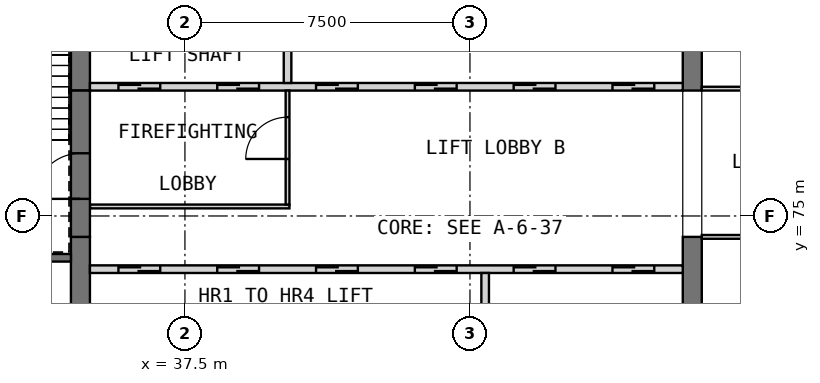
"""IFC4 building model, lengths in metres.
Left out: names, types, materials, properties, quantities, classifications, styles, units other than length and angle.
Written with IfcOpenShell. Run it as: python <this file> out.ifc"""

import sys

from ifc_helpers import new_model, si_unit, direction, frame, frame_2d, origin, place, context, subcontext, project, spatial, rectangle, extrude, element, fill, save


model = new_model("IFC4")
c1 = context("Model", 3, precision=1e-05, world=origin(), true_north=direction((0.0, 1.0)))
c2 = subcontext(c1, "Body", "Model", "MODEL_VIEW")
j1 = project(units=[si_unit("LENGTHUNIT", "METRE"), si_unit("PLANEANGLEUNIT", "RADIAN")], contexts=[c1])
p1 = place(None, origin())
s1 = spatial("IfcSite", under=j1, at=p1, CompositionType="ELEMENT")
p2 = place(p1, origin())
s2 = spatial("IfcBuilding", under=s1, at=p2, CompositionType="ELEMENT")
p3 = place(p2, frame((0.0, 0.0, 308.7)))
s3 = spatial("IfcBuildingStorey", under=s2, at=p3, CompositionType="ELEMENT", Elevation=308.7)
p4 = place(p3, frame((34.75, 68.05, 0.0), z_axis=(0.0, 0.0, 1.0), x_axis=(0.0, 1.0, 0.0)))
e1 = element("IfcWall", 1, at=p4, inside=s3, PredefinedType="SHEAR", context=c2, shape_type="SweptSolid", body=[
    extrude(rectangle(XDim=6.4, YDim=0.5, at=frame_2d((3.2, 0.0))), origin(), (0.0, 0.0, 1.0), 6.0),
])
p5 = place(p3, frame((34.75, 78.3, 0.0), z_axis=(0.0, 0.0, 1.0), x_axis=(0.0, 1.0, 0.0)))
e2 = element("IfcWall", 2, at=p5, inside=s3, PredefinedType="SHEAR", context=c2, shape_type="SweptSolid", body=[
    extrude(rectangle(XDim=3.6, YDim=0.5, at=frame_2d((1.8, 0.0))), origin(), (0.0, 0.0, 1.0), 6.0),
])
p6 = place(p3, frame((50.85, 68.05, 0.0), z_axis=(0.0, 0.0, 1.0), x_axis=(0.0, 1.0, 0.0)))
e3 = element("IfcWall", 3, at=p6, inside=s3, PredefinedType="SHEAR", context=c2, shape_type="SweptSolid", body=[
    extrude(rectangle(XDim=6.4, YDim=0.5, at=frame_2d((3.2, 0.0))), origin(), (0.0, 0.0, 1.0), 6.0),
])
p7 = place(p3, frame((50.85, 78.3, 0.0), z_axis=(0.0, 0.0, 1.0), x_axis=(0.0, 1.0, 0.0)))
e4 = element("IfcWall", 4, at=p7, inside=s3, PredefinedType="SHEAR", context=c2, shape_type="SweptSolid", body=[
    extrude(rectangle(XDim=3.6, YDim=0.5, at=frame_2d((1.8, 0.0))), origin(), (0.0, 0.0, 1.0), 6.0),
])
p8 = place(p3, frame((35.0, 73.6, 0.0), z_axis=(0.0, 0.0, 1.0), x_axis=(1.0, 0.0, 0.0)))
e5 = element("IfcWall", 5, at=p8, inside=s3, PredefinedType="SOLIDWALL", context=c2, shape_type="SweptSolid", body=[
    extrude(rectangle(XDim=15.6, YDim=0.2, at=frame_2d((7.8, 0.0))), origin(), (0.0, 0.0, 1.0), 6.0),
])
p9 = place(p8, frame((0.75, 0.0, 0.0)))
e6 = element("IfcOpeningElement", 6, at=p9, cuts=e5, PredefinedType="OPENING", context=c2, shape_type="SweptSolid", body=[
    extrude(rectangle(XDim=1.1, YDim=2.1, at=frame_2d((0.55, 1.05))), frame((0.0, 0.11, 0.0), z_axis=(0.0, -1.0, 0.0), x_axis=(1.0, 0.0, 0.0)), (0.0, 0.0, 1.0), 0.22),
])
p10 = place(p8, frame((3.35, 0.0, 0.0)))
e7 = element("IfcOpeningElement", 7, at=p10, cuts=e5, PredefinedType="OPENING", context=c2, shape_type="SweptSolid", body=[
    extrude(rectangle(XDim=1.1, YDim=2.1, at=frame_2d((0.55, 1.05))), frame((0.0, 0.11, 0.0), z_axis=(0.0, -1.0, 0.0), x_axis=(1.0, 0.0, 0.0)), (0.0, 0.0, 1.0), 0.22),
])
p11 = place(p8, frame((5.95, 0.0, 0.0)))
e8 = element("IfcOpeningElement", 8, at=p11, cuts=e5, PredefinedType="OPENING", context=c2, shape_type="SweptSolid", body=[
    extrude(rectangle(XDim=1.1, YDim=2.1, at=frame_2d((0.55, 1.05))), frame((0.0, 0.11, 0.0), z_axis=(0.0, -1.0, 0.0), x_axis=(1.0, 0.0, 0.0)), (0.0, 0.0, 1.0), 0.22),
])
p12 = place(p8, frame((8.55, 0.0, 0.0)))
e9 = element("IfcOpeningElement", 9, at=p12, cuts=e5, PredefinedType="OPENING", context=c2, shape_type="SweptSolid", body=[
    extrude(rectangle(XDim=1.1, YDim=2.1, at=frame_2d((0.55, 1.05))), frame((0.0, 0.11, 0.0), z_axis=(0.0, -1.0, 0.0), x_axis=(1.0, 0.0, 0.0)), (0.0, 0.0, 1.0), 0.22),
])
p13 = place(p8, frame((11.15, 0.0, 0.0)))
e10 = element("IfcOpeningElement", 10, at=p13, cuts=e5, PredefinedType="OPENING", context=c2, shape_type="SweptSolid", body=[
    extrude(rectangle(XDim=1.1, YDim=2.1, at=frame_2d((0.55, 1.05))), frame((0.0, 0.11, 0.0), z_axis=(0.0, -1.0, 0.0), x_axis=(1.0, 0.0, 0.0)), (0.0, 0.0, 1.0), 0.22),
])
p14 = place(p8, frame((13.75, 0.0, 0.0)))
e11 = element("IfcOpeningElement", 11, at=p14, cuts=e5, PredefinedType="OPENING", context=c2, shape_type="SweptSolid", body=[
    extrude(rectangle(XDim=1.1, YDim=2.1, at=frame_2d((0.55, 1.05))), frame((0.0, 0.11, 0.0), z_axis=(0.0, -1.0, 0.0), x_axis=(1.0, 0.0, 0.0)), (0.0, 0.0, 1.0), 0.22),
])
p15 = place(p3, frame((45.4, 71.5, 0.0), z_axis=(0.0, 0.0, 1.0), x_axis=(0.0, 1.0, 0.0)))
e12 = element("IfcWall", 12, at=p15, inside=s3, PredefinedType="SOLIDWALL", context=c2, shape_type="SweptSolid", body=[
    extrude(rectangle(XDim=2.0, YDim=0.2, at=frame_2d((1.0, 0.0))), origin(), (0.0, 0.0, 1.0), 6.0),
])
p16 = place(p3, frame((35.0, 78.4, 0.0), z_axis=(0.0, 0.0, 1.0), x_axis=(1.0, 0.0, 0.0)))
e13 = element("IfcWall", 13, at=p16, inside=s3, PredefinedType="SOLIDWALL", context=c2, shape_type="SweptSolid", body=[
    extrude(rectangle(XDim=15.6, YDim=0.2, at=frame_2d((7.8, 0.0))), origin(), (0.0, 0.0, 1.0), 6.0),
])
p17 = place(p16, frame((0.75, 0.0, 0.0)))
e14 = element("IfcOpeningElement", 14, at=p17, cuts=e13, PredefinedType="OPENING", context=c2, shape_type="SweptSolid", body=[
    extrude(rectangle(XDim=1.1, YDim=2.1, at=frame_2d((0.55, 1.05))), frame((0.0, 0.11, 0.0), z_axis=(0.0, -1.0, 0.0), x_axis=(1.0, 0.0, 0.0)), (0.0, 0.0, 1.0), 0.22),
])
p18 = place(p16, frame((3.35, 0.0, 0.0)))
e15 = element("IfcOpeningElement", 15, at=p18, cuts=e13, PredefinedType="OPENING", context=c2, shape_type="SweptSolid", body=[
    extrude(rectangle(XDim=1.1, YDim=2.1, at=frame_2d((0.55, 1.05))), frame((0.0, 0.11, 0.0), z_axis=(0.0, -1.0, 0.0), x_axis=(1.0, 0.0, 0.0)), (0.0, 0.0, 1.0), 0.22),
])
p19 = place(p16, frame((5.95, 0.0, 0.0)))
e16 = element("IfcOpeningElement", 16, at=p19, cuts=e13, PredefinedType="OPENING", context=c2, shape_type="SweptSolid", body=[
    extrude(rectangle(XDim=1.1, YDim=2.1, at=frame_2d((0.55, 1.05))), frame((0.0, 0.11, 0.0), z_axis=(0.0, -1.0, 0.0), x_axis=(1.0, 0.0, 0.0)), (0.0, 0.0, 1.0), 0.22),
])
p20 = place(p16, frame((8.55, 0.0, 0.0)))
e17 = element("IfcOpeningElement", 17, at=p20, cuts=e13, PredefinedType="OPENING", context=c2, shape_type="SweptSolid", body=[
    extrude(rectangle(XDim=1.1, YDim=2.1, at=frame_2d((0.55, 1.05))), frame((0.0, 0.11, 0.0), z_axis=(0.0, -1.0, 0.0), x_axis=(1.0, 0.0, 0.0)), (0.0, 0.0, 1.0), 0.22),
])
p21 = place(p16, frame((11.15, 0.0, 0.0)))
e18 = element("IfcOpeningElement", 18, at=p21, cuts=e13, PredefinedType="OPENING", context=c2, shape_type="SweptSolid", body=[
    extrude(rectangle(XDim=1.1, YDim=2.1, at=frame_2d((0.55, 1.05))), frame((0.0, 0.11, 0.0), z_axis=(0.0, -1.0, 0.0), x_axis=(1.0, 0.0, 0.0)), (0.0, 0.0, 1.0), 0.22),
])
p22 = place(p16, frame((13.75, 0.0, 0.0)))
e19 = element("IfcOpeningElement", 19, at=p22, cuts=e13, PredefinedType="OPENING", context=c2, shape_type="SweptSolid", body=[
    extrude(rectangle(XDim=1.1, YDim=2.1, at=frame_2d((0.55, 1.05))), frame((0.0, 0.11, 0.0), z_axis=(0.0, -1.0, 0.0), x_axis=(1.0, 0.0, 0.0)), (0.0, 0.0, 1.0), 0.22),
])
p23 = place(p3, frame((40.2, 78.5, 0.0), z_axis=(0.0, 0.0, 1.0), x_axis=(0.0, 1.0, 0.0)))
e20 = element("IfcWall", 20, at=p23, inside=s3, PredefinedType="SOLIDWALL", context=c2, shape_type="SweptSolid", body=[
    extrude(rectangle(XDim=3.4, YDim=0.2, at=frame_2d((1.7, 0.0))), origin(), (0.0, 0.0, 1.0), 6.0),
])
p24 = place(p3, frame((35.0, 75.25, 0.0), z_axis=(0.0, 0.0, 1.0), x_axis=(1.0, 0.0, 0.0)))
e21 = element("IfcWall", 21, at=p24, inside=s3, PredefinedType="PARTITIONING", context=c2, shape_type="SweptSolid", body=[
    extrude(rectangle(XDim=5.25, YDim=0.1, at=frame_2d((2.625, 0.0))), origin(), (0.0, 0.0, 1.0), 5.59),
])
p25 = place(p3, frame((40.2, 75.3, 0.0), z_axis=(0.0, 0.0, 1.0), x_axis=(0.0, 1.0, 0.0)))
e22 = element("IfcWall", 22, at=p25, inside=s3, PredefinedType="PARTITIONING", context=c2, shape_type="SweptSolid", body=[
    extrude(rectangle(XDim=3.0, YDim=0.1, at=frame_2d((1.5, 0.0))), origin(), (0.0, 0.0, 1.0), 5.59),
])
p26 = place(p25, frame((1.2, 0.0, 0.0)))
e23 = element("IfcOpeningElement", 23, at=p26, cuts=e22, PredefinedType="OPENING", context=c2, shape_type="SweptSolid", body=[
    extrude(rectangle(XDim=1.1, YDim=2.1, at=frame_2d((0.55, 1.05))), frame((0.0, 0.06, 0.0), z_axis=(0.0, -1.0, 0.0), x_axis=(1.0, 0.0, 0.0)), (0.0, 0.0, 1.0), 0.12),
])
p27 = place(p3, frame((34.75, 74.45, 0.0), z_axis=(0.0, 0.0, 1.0), x_axis=(0.0, 1.0, 0.0)))
e24 = element("IfcWall", 24, at=p27, inside=s3, PredefinedType="SOLIDWALL", context=c2, shape_type="SweptSolid", body=[
    extrude(rectangle(XDim=3.85, YDim=0.5, at=frame_2d((1.925, 0.0))), origin(), (0.0, 0.0, 1.0), 4.8),
])
p28 = place(p27, frame((1.0, 0.0, 0.0)))
e25 = element("IfcOpeningElement", 25, at=p28, cuts=e24, PredefinedType="OPENING", context=c2, shape_type="SweptSolid", body=[
    extrude(rectangle(XDim=1.2, YDim=2.1, at=frame_2d((0.6, 1.05))), frame((0.0, 0.26, 0.0), z_axis=(0.0, -1.0, 0.0), x_axis=(1.0, 0.0, 0.0)), (0.0, 0.0, 1.0), 0.52),
])
p29 = place(p3, frame((30.6, 73.9, 0.0), z_axis=(0.0, 0.0, 1.0), x_axis=(1.0, 0.0, 0.0)))
e26 = element("IfcWall", 26, at=p29, inside=s3, PredefinedType="SOLIDWALL", context=c2, shape_type="SweptSolid", body=[
    extrude(rectangle(XDim=3.9, YDim=0.2, at=frame_2d((1.95, 0.0))), origin(), (0.0, 0.0, 1.0), 5.59),
])
p30 = place(p29, frame((1.7, 0.0, 0.0)))
e27 = element("IfcOpeningElement", 27, at=p30, cuts=e26, PredefinedType="OPENING", context=c2, shape_type="SweptSolid", body=[
    extrude(rectangle(XDim=0.9, YDim=2.1, at=frame_2d((0.45, 1.05))), frame((0.0, 0.11, 0.0), z_axis=(0.0, -1.0, 0.0), x_axis=(1.0, 0.0, 0.0)), (0.0, 0.0, 1.0), 0.22),
])
p31 = place(p3, frame((51.1, 74.45, 0.0), z_axis=(0.0, 0.0, 1.0), x_axis=(1.0, 0.0, 0.0)))
e28 = element("IfcWall", 28, at=p31, inside=s3, PredefinedType="PARTITIONING", context=c2, shape_type="SweptSolid", body=[
    extrude(rectangle(XDim=8.3, YDim=0.1, at=frame_2d((4.15, 0.0))), origin(), (0.0, 0.0, 1.0), 5.59),
])
p32 = place(p31, frame((3.7, 0.0, 0.0)))
e29 = element("IfcOpeningElement", 29, at=p32, cuts=e28, PredefinedType="OPENING", context=c2, shape_type="SweptSolid", body=[
    extrude(rectangle(XDim=0.9, YDim=2.1, at=frame_2d((0.45, 1.05))), frame((0.0, 0.06, 0.0), z_axis=(0.0, -1.0, 0.0), x_axis=(1.0, 0.0, 0.0)), (0.0, 0.0, 1.0), 0.12),
])
p33 = place(p3, frame((51.1, 78.35, 0.0), z_axis=(0.0, 0.0, 1.0), x_axis=(1.0, 0.0, 0.0)))
e30 = element("IfcWall", 30, at=p33, inside=s3, PredefinedType="PARTITIONING", context=c2, shape_type="SweptSolid", body=[
    extrude(rectangle(XDim=8.3, YDim=0.1, at=frame_2d((4.15, 0.0))), origin(), (0.0, 0.0, 1.0), 5.59),
])
p34 = place(p33, frame((3.7, 0.0, 0.0)))
e31 = element("IfcOpeningElement", 31, at=p34, cuts=e30, PredefinedType="OPENING", context=c2, shape_type="SweptSolid", body=[
    extrude(rectangle(XDim=0.9, YDim=2.1, at=frame_2d((0.45, 1.05))), frame((0.0, 0.06, 0.0), z_axis=(0.0, -1.0, 0.0), x_axis=(1.0, 0.0, 0.0)), (0.0, 0.0, 1.0), 0.12),
])
p35 = place(p9, origin())
e32 = element("IfcDoor", 32, at=p35, inside=s3, OperationType="DOUBLE_DOOR_SLIDING", PredefinedType="DOOR", context=c2, shape_type="SweptSolid", body=[
    extrude(rectangle(XDim=1.1, YDim=2.1, at=frame_2d((0.55, 1.05))), frame((0.0, 0.025, 0.0), z_axis=(0.0, -1.0, 0.0), x_axis=(1.0, 0.0, 0.0)), (0.0, 0.0, 1.0), 0.05),
])
fill(e6, e32)
p36 = place(p10, origin())
e33 = element("IfcDoor", 33, at=p36, inside=s3, OperationType="DOUBLE_DOOR_SLIDING", PredefinedType="DOOR", context=c2, shape_type="SweptSolid", body=[
    extrude(rectangle(XDim=1.1, YDim=2.1, at=frame_2d((0.55, 1.05))), frame((0.0, 0.025, 0.0), z_axis=(0.0, -1.0, 0.0), x_axis=(1.0, 0.0, 0.0)), (0.0, 0.0, 1.0), 0.05),
])
fill(e7, e33)
p37 = place(p11, origin())
e34 = element("IfcDoor", 34, at=p37, inside=s3, OperationType="DOUBLE_DOOR_SLIDING", PredefinedType="DOOR", context=c2, shape_type="SweptSolid", body=[
    extrude(rectangle(XDim=1.1, YDim=2.1, at=frame_2d((0.55, 1.05))), frame((0.0, 0.025, 0.0), z_axis=(0.0, -1.0, 0.0), x_axis=(1.0, 0.0, 0.0)), (0.0, 0.0, 1.0), 0.05),
])
fill(e8, e34)
p38 = place(p12, origin())
e35 = element("IfcDoor", 35, at=p38, inside=s3, OperationType="DOUBLE_DOOR_SLIDING", PredefinedType="DOOR", context=c2, shape_type="SweptSolid", body=[
    extrude(rectangle(XDim=1.1, YDim=2.1, at=frame_2d((0.55, 1.05))), frame((0.0, 0.025, 0.0), z_axis=(0.0, -1.0, 0.0), x_axis=(1.0, 0.0, 0.0)), (0.0, 0.0, 1.0), 0.05),
])
fill(e9, e35)
p39 = place(p13, origin())
e36 = element("IfcDoor", 36, at=p39, inside=s3, OperationType="DOUBLE_DOOR_SLIDING", PredefinedType="DOOR", context=c2, shape_type="SweptSolid", body=[
    extrude(rectangle(XDim=1.1, YDim=2.1, at=frame_2d((0.55, 1.05))), frame((0.0, 0.025, 0.0), z_axis=(0.0, -1.0, 0.0), x_axis=(1.0, 0.0, 0.0)), (0.0, 0.0, 1.0), 0.05),
])
fill(e10, e36)
p40 = place(p14, origin())
e37 = element("IfcDoor", 37, at=p40, inside=s3, OperationType="DOUBLE_DOOR_SLIDING", PredefinedType="DOOR", context=c2, shape_type="SweptSolid", body=[
    extrude(rectangle(XDim=1.1, YDim=2.1, at=frame_2d((0.55, 1.05))), frame((0.0, 0.025, 0.0), z_axis=(0.0, -1.0, 0.0), x_axis=(1.0, 0.0, 0.0)), (0.0, 0.0, 1.0), 0.05),
])
fill(e11, e37)
p41 = place(p17, origin())
e38 = element("IfcDoor", 38, at=p41, inside=s3, OperationType="DOUBLE_DOOR_SLIDING", PredefinedType="DOOR", context=c2, shape_type="SweptSolid", body=[
    extrude(rectangle(XDim=1.1, YDim=2.1, at=frame_2d((0.55, 1.05))), frame((0.0, 0.025, 0.0), z_axis=(0.0, -1.0, 0.0), x_axis=(1.0, 0.0, 0.0)), (0.0, 0.0, 1.0), 0.05),
])
fill(e14, e38)
p42 = place(p18, origin())
e39 = element("IfcDoor", 39, at=p42, inside=s3, OperationType="DOUBLE_DOOR_SLIDING", PredefinedType="DOOR", context=c2, shape_type="SweptSolid", body=[
    extrude(rectangle(XDim=1.1, YDim=2.1, at=frame_2d((0.55, 1.05))), frame((0.0, 0.025, 0.0), z_axis=(0.0, -1.0, 0.0), x_axis=(1.0, 0.0, 0.0)), (0.0, 0.0, 1.0), 0.05),
])
fill(e15, e39)
p43 = place(p19, origin())
e40 = element("IfcDoor", 40, at=p43, inside=s3, OperationType="DOUBLE_DOOR_SLIDING", PredefinedType="DOOR", context=c2, shape_type="SweptSolid", body=[
    extrude(rectangle(XDim=1.1, YDim=2.1, at=frame_2d((0.55, 1.05))), frame((0.0, 0.025, 0.0), z_axis=(0.0, -1.0, 0.0), x_axis=(1.0, 0.0, 0.0)), (0.0, 0.0, 1.0), 0.05),
])
fill(e16, e40)
p44 = place(p20, origin())
e41 = element("IfcDoor", 41, at=p44, inside=s3, OperationType="DOUBLE_DOOR_SLIDING", PredefinedType="DOOR", context=c2, shape_type="SweptSolid", body=[
    extrude(rectangle(XDim=1.1, YDim=2.1, at=frame_2d((0.55, 1.05))), frame((0.0, 0.025, 0.0), z_axis=(0.0, -1.0, 0.0), x_axis=(1.0, 0.0, 0.0)), (0.0, 0.0, 1.0), 0.05),
])
fill(e17, e41)
p45 = place(p21, origin())
e42 = element("IfcDoor", 42, at=p45, inside=s3, OperationType="DOUBLE_DOOR_SLIDING", PredefinedType="DOOR", context=c2, shape_type="SweptSolid", body=[
    extrude(rectangle(XDim=1.1, YDim=2.1, at=frame_2d((0.55, 1.05))), frame((0.0, 0.025, 0.0), z_axis=(0.0, -1.0, 0.0), x_axis=(1.0, 0.0, 0.0)), (0.0, 0.0, 1.0), 0.05),
])
fill(e18, e42)
p46 = place(p22, origin())
e43 = element("IfcDoor", 43, at=p46, inside=s3, OperationType="DOUBLE_DOOR_SLIDING", PredefinedType="DOOR", context=c2, shape_type="SweptSolid", body=[
    extrude(rectangle(XDim=1.1, YDim=2.1, at=frame_2d((0.55, 1.05))), frame((0.0, 0.025, 0.0), z_axis=(0.0, -1.0, 0.0), x_axis=(1.0, 0.0, 0.0)), (0.0, 0.0, 1.0), 0.05),
])
fill(e19, e43)
p47 = place(p26, origin())
e44 = element("IfcDoor", 44, at=p47, inside=s3, OperationType="SINGLE_SWING_LEFT", PredefinedType="DOOR", context=c2, shape_type="SweptSolid", body=[
    extrude(rectangle(XDim=1.1, YDim=2.1, at=frame_2d((0.55, 1.05))), frame((0.0, 0.025, 0.0), z_axis=(0.0, -1.0, 0.0), x_axis=(1.0, 0.0, 0.0)), (0.0, 0.0, 1.0), 0.05),
])
fill(e23, e44)
p48 = place(p28, origin())
e45 = element("IfcDoor", 45, at=p48, inside=s3, OperationType="SINGLE_SWING_RIGHT", PredefinedType="DOOR", context=c2, shape_type="SweptSolid", body=[
    extrude(rectangle(XDim=1.2, YDim=2.1, at=frame_2d((0.6, 1.05))), frame((0.0, 0.025, 0.0), z_axis=(0.0, -1.0, 0.0), x_axis=(1.0, 0.0, 0.0)), (0.0, 0.0, 1.0), 0.05),
])
fill(e25, e45)
save(model, sys.argv[1])
